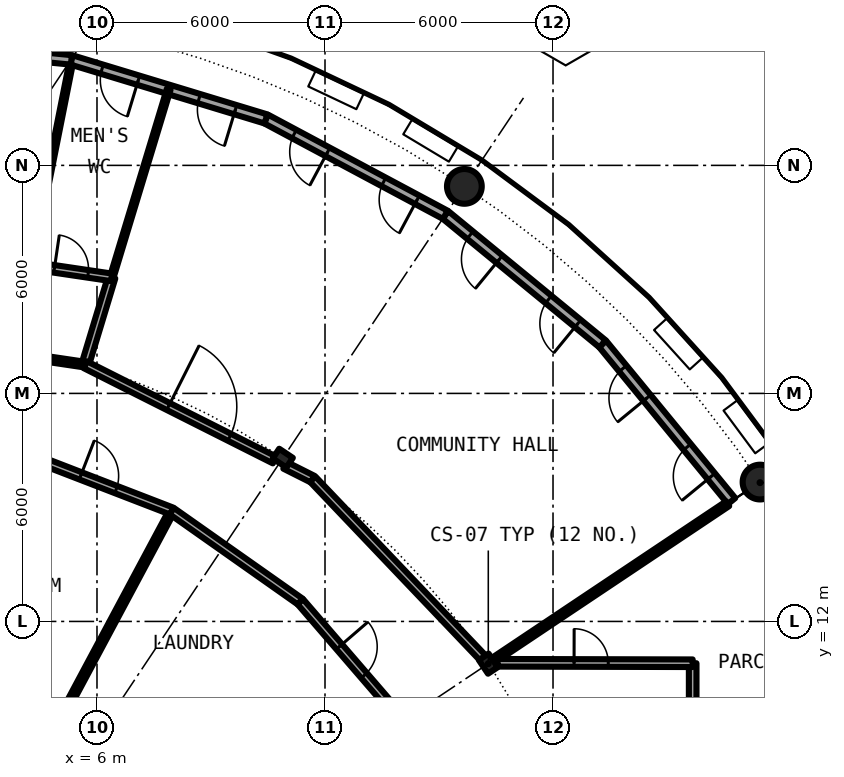
"""IFC4 building model, lengths in metres.
Left out: names, types, materials, properties, quantities, classifications, styles, units other than length and angle.
Written with IfcOpenShell. Run it as: python <this file> out.ifc"""

import sys

from ifc_helpers import new_model, si_unit, direction, frame, frame_2d, origin, origin_2d, place, context, subcontext, project, spatial, rectangle, hollow_circle, i_section, extrude, element, fill, save


model = new_model("IFC4")
c1 = context("Model", 3, precision=1e-05, world=origin(), true_north=direction((0.0, 1.0)))
c2 = subcontext(c1, "Body", "Model", "MODEL_VIEW")
j1 = project(units=[si_unit("LENGTHUNIT", "METRE"), si_unit("PLANEANGLEUNIT", "RADIAN")], contexts=[c1])
p1 = place(None, origin())
s1 = spatial("IfcSite", under=j1, at=p1, CompositionType="ELEMENT")
p2 = place(p1, origin())
s2 = spatial("IfcBuilding", under=s1, at=p2, CompositionType="ELEMENT")
p3 = place(p2, frame((0.0, 0.0, 107.45)))
s3 = spatial("IfcBuildingStorey", under=s2, at=p3, CompositionType="ELEMENT", Elevation=107.45)
for number, where, z_axis, x_axis in (
    (1, (23.448, 15.667, 0.0), (0.0, 0.0, 1.0), (1.0, 0.0, 0.0)),
    (2, (15.667, 23.448, 0.0), (0.0, 0.0, 1.0), (1.0, 0.0, 0.0)),
):
    element("IfcColumn", number, at=place(p3, frame(where, z_axis=z_axis, x_axis=x_axis)), inside=s3, PredefinedType="COLUMN", context=c2, shape_type="SweptSolid", body=[
        extrude(hollow_circle(Radius=0.457, WallThickness=0.04, at=origin_2d()), origin(), (0.0, 0.0, 1.0), 4.2),
    ])
for number, where, z_axis, x_axis in (
    (3, (16.297, 10.889, 0.0), (0.0, 0.0, 1.0), (0.831, 0.556, 0.0)),
    (4, (10.889, 16.297, 0.0), (0.0, 0.0, 1.0), (0.556, 0.831, 0.0)),
):
    element("IfcColumn", number, at=place(p3, frame(where, z_axis=z_axis, x_axis=x_axis)), inside=s3, PredefinedType="COLUMN", context=c2, shape_type="SweptSolid", body=[
        extrude(i_section(OverallWidth=0.307, OverallDepth=0.432, WebThickness=0.021, FlangeThickness=0.04, FilletRadius=0.027, at=origin_2d()), origin(), (0.0, 0.0, 1.0), 4.2),
    ])
p4 = place(p3, frame((22.699, 15.167, 0.0), z_axis=(0.0, 0.0, 1.0), x_axis=(-0.634382322723, 0.773019449054, 0.0)))
e5 = element("IfcWall", 5, at=p4, inside=s3, PredefinedType="SOLIDWALL", context=c2, shape_type="SweptSolid", body=[
    extrude(rectangle(XDim=5.352, YDim=0.25, at=frame_2d((2.676, 0.0))), origin(), (0.0, 0.0, 1.0), 3.85),
])
p5 = place(p4, frame((0.841, 0.0, 0.0)))
e6 = element("IfcOpeningElement", 6, at=p5, cuts=e5, PredefinedType="OPENING", context=c2, shape_type="SweptSolid", body=[
    extrude(rectangle(XDim=1.0, YDim=2.2, at=frame_2d((0.5, 1.1))), frame((0.0, 0.135, 0.0), z_axis=(0.0, -1.0, 0.0), x_axis=(1.0, 0.0, 0.0)), (0.0, 0.0, 1.0), 0.27),
])
p6 = place(p4, frame((3.51, 0.0, 0.0)))
e7 = element("IfcOpeningElement", 7, at=p6, cuts=e5, PredefinedType="OPENING", context=c2, shape_type="SweptSolid", body=[
    extrude(rectangle(XDim=1.0, YDim=2.2, at=frame_2d((0.5, 1.1))), frame((0.0, 0.135, 0.0), z_axis=(0.0, -1.0, 0.0), x_axis=(1.0, 0.0, 0.0)), (0.0, 0.0, 1.0), 0.27),
])
p7 = place(p3, frame((19.304, 19.304, 0.0), z_axis=(0.0, 0.0, 1.0), x_axis=(-0.773019449054, 0.634382322723, 0.0)))
e8 = element("IfcWall", 8, at=p7, inside=s3, PredefinedType="SOLIDWALL", context=c2, shape_type="SweptSolid", body=[
    extrude(rectangle(XDim=5.352, YDim=0.25, at=frame_2d((2.676, 0.0))), origin(), (0.0, 0.0, 1.0), 3.85),
])
p8 = place(p7, frame((0.841, 0.0, 0.0)))
e9 = element("IfcOpeningElement", 9, at=p8, cuts=e8, PredefinedType="OPENING", context=c2, shape_type="SweptSolid", body=[
    extrude(rectangle(XDim=1.0, YDim=2.2, at=frame_2d((0.5, 1.1))), frame((0.0, 0.135, 0.0), z_axis=(0.0, -1.0, 0.0), x_axis=(1.0, 0.0, 0.0)), (0.0, 0.0, 1.0), 0.27),
])
p9 = place(p7, frame((3.51, 0.0, 0.0)))
e10 = element("IfcOpeningElement", 10, at=p9, cuts=e8, PredefinedType="OPENING", context=c2, shape_type="SweptSolid", body=[
    extrude(rectangle(XDim=1.0, YDim=2.2, at=frame_2d((0.5, 1.1))), frame((0.0, 0.135, 0.0), z_axis=(0.0, -1.0, 0.0), x_axis=(1.0, 0.0, 0.0)), (0.0, 0.0, 1.0), 0.27),
])
p10 = place(p3, frame((15.167, 22.699, 0.0), z_axis=(0.0, 0.0, 1.0), x_axis=(-0.881915646801, 0.471407246368, 0.0)))
e11 = element("IfcWall", 11, at=p10, inside=s3, PredefinedType="SOLIDWALL", context=c2, shape_type="SweptSolid", body=[
    extrude(rectangle(XDim=5.352, YDim=0.25, at=frame_2d((2.676, 0.0))), origin(), (0.0, 0.0, 1.0), 3.85),
])
p11 = place(p10, frame((0.841, 0.0, 0.0)))
e12 = element("IfcOpeningElement", 12, at=p11, cuts=e11, PredefinedType="OPENING", context=c2, shape_type="SweptSolid", body=[
    extrude(rectangle(XDim=1.0, YDim=2.2, at=frame_2d((0.5, 1.1))), frame((0.0, 0.135, 0.0), z_axis=(0.0, -1.0, 0.0), x_axis=(1.0, 0.0, 0.0)), (0.0, 0.0, 1.0), 0.27),
])
p12 = place(p10, frame((3.51, 0.0, 0.0)))
e13 = element("IfcOpeningElement", 13, at=p12, cuts=e11, PredefinedType="OPENING", context=c2, shape_type="SweptSolid", body=[
    extrude(rectangle(XDim=1.0, YDim=2.2, at=frame_2d((0.5, 1.1))), frame((0.0, 0.135, 0.0), z_axis=(0.0, -1.0, 0.0), x_axis=(1.0, 0.0, 0.0)), (0.0, 0.0, 1.0), 0.27),
])
p13 = place(p3, frame((10.447, 25.222, 0.0), z_axis=(0.0, 0.0, 1.0), x_axis=(-0.956965678721, 0.290201119486, 0.0)))
e14 = element("IfcWall", 14, at=p13, inside=s3, PredefinedType="SOLIDWALL", context=c2, shape_type="SweptSolid", body=[
    extrude(rectangle(XDim=5.351, YDim=0.25, at=frame_2d((2.676, 0.0))), origin(), (0.0, 0.0, 1.0), 3.85),
])
p14 = place(p13, frame((0.841, 0.0, 0.0)))
e15 = element("IfcOpeningElement", 15, at=p14, cuts=e14, PredefinedType="OPENING", context=c2, shape_type="SweptSolid", body=[
    extrude(rectangle(XDim=1.0, YDim=2.2, at=frame_2d((0.5, 1.1))), frame((0.0, 0.135, 0.0), z_axis=(0.0, -1.0, 0.0), x_axis=(1.0, 0.0, 0.0)), (0.0, 0.0, 1.0), 0.27),
])
p15 = place(p13, frame((3.51, 0.0, 0.0)))
e16 = element("IfcOpeningElement", 16, at=p15, cuts=e14, PredefinedType="OPENING", context=c2, shape_type="SweptSolid", body=[
    extrude(rectangle(XDim=1.0, YDim=2.2, at=frame_2d((0.5, 1.1))), frame((0.0, 0.135, 0.0), z_axis=(0.0, -1.0, 0.0), x_axis=(1.0, 0.0, 0.0)), (0.0, 0.0, 1.0), 0.27),
])
p16 = place(p3, frame((5.326, 26.775, 0.0), z_axis=(0.0, 0.0, 1.0), x_axis=(-0.995173996315, 0.098126026407, 0.0)))
e17 = element("IfcWall", 17, at=p16, inside=s3, PredefinedType="SOLIDWALL", context=c2, shape_type="SweptSolid", body=[
    extrude(rectangle(XDim=5.352, YDim=0.25, at=frame_2d((2.676, 0.0))), origin(), (0.0, 0.0, 1.0), 3.85),
])
p17 = place(p16, frame((0.841, 0.0, 0.0)))
e18 = element("IfcOpeningElement", 18, at=p17, cuts=e17, PredefinedType="OPENING", context=c2, shape_type="SweptSolid", body=[
    extrude(rectangle(XDim=1.0, YDim=2.2, at=frame_2d((0.5, 1.1))), frame((0.0, 0.135, 0.0), z_axis=(0.0, -1.0, 0.0), x_axis=(1.0, 0.0, 0.0)), (0.0, 0.0, 1.0), 0.27),
])
p18 = place(p16, frame((3.51, 0.0, 0.0)))
e19 = element("IfcOpeningElement", 19, at=p18, cuts=e17, PredefinedType="OPENING", context=c2, shape_type="SweptSolid", body=[
    extrude(rectangle(XDim=1.0, YDim=2.2, at=frame_2d((0.5, 1.1))), frame((0.0, 0.135, 0.0), z_axis=(0.0, -1.0, 0.0), x_axis=(1.0, 0.0, 0.0)), (0.0, 0.0, 1.0), 0.27),
])
p19 = place(p3, frame((21.675, 9.2, 0.0), z_axis=(0.0, 0.0, 1.0), x_axis=(0.0, 1.0, 0.0)))
e20 = element("IfcWall", 20, at=p19, inside=s3, PredefinedType="PARTITIONING", context=c2, shape_type="SweptSolid", body=[
    extrude(rectangle(XDim=1.7, YDim=0.2, at=frame_2d((0.85, 0.0))), origin(), (0.0, 0.0, 1.0), 3.85),
])
p20 = place(p3, frame((3.639, 6.808, 0.0), z_axis=(0.0, 0.0, 1.0), x_axis=(0.471460365694, 0.881887251059, 0.0)))
e21 = element("IfcWall", 21, at=p20, inside=s3, PredefinedType="PARTITIONING", context=c2, shape_type="SweptSolid", body=[
    extrude(rectangle(XDim=9.18, YDim=0.15, at=frame_2d((4.59, 0.0))), origin(), (0.0, 0.0, 1.0), 3.85),
])
p21 = place(p3, frame((4.258, 21.368, 0.0), z_axis=(0.0, 0.0, 1.0), x_axis=(0.195296766469, 0.980744193461, 0.0)))
e22 = element("IfcWall", 22, at=p21, inside=s3, PredefinedType="PARTITIONING", context=c2, shape_type="SweptSolid", body=[
    extrude(rectangle(XDim=5.387, YDim=0.1, at=frame_2d((2.693, 0.0))), origin(), (0.0, 0.0, 1.0), 3.85),
])
p22 = place(p3, frame((5.69, 18.756, 0.0), z_axis=(0.0, 0.0, 1.0), x_axis=(0.290015865164, 0.957021837762, 0.0)))
e23 = element("IfcWall", 23, at=p22, inside=s3, PredefinedType="PARTITIONING", context=c2, shape_type="SweptSolid", body=[
    extrude(rectangle(XDim=2.4, YDim=0.2, at=frame_2d((1.2, 0.0))), origin(), (0.0, 0.0, 1.0), 3.85),
])
p23 = place(p3, frame((6.386, 21.053, 0.0), z_axis=(0.0, 0.0, 1.0), x_axis=(0.29025094386, 0.956950567996, 0.0)))
e24 = element("IfcWall", 24, at=p23, inside=s3, PredefinedType="PARTITIONING", context=c2, shape_type="SweptSolid", body=[
    extrude(rectangle(XDim=5.175, YDim=0.1, at=frame_2d((2.587, 0.0))), origin(), (0.0, 0.0, 1.0), 3.85),
])
p24 = place(p3, frame((16.477, 11.009, 0.0), z_axis=(0.0, 0.0, 1.0), x_axis=(0.831406593008, 0.555664536482, 0.0)))
e25 = element("IfcWall", 25, at=p24, inside=s3, PredefinedType="PARTITIONING", context=c2, shape_type="SweptSolid", body=[
    extrude(rectangle(XDim=7.358, YDim=0.15, at=frame_2d((3.679, 0.0))), origin(), (0.0, 0.0, 1.0), 3.85),
])
p25 = place(p3, frame((16.541, 10.912, 0.0), z_axis=(0.0, 0.0, 1.0), x_axis=(0.999997173357, -0.002377662213, 0.0)))
e26 = element("IfcWall", 26, at=p25, inside=s3, PredefinedType="PARTITIONING", context=c2, shape_type="SweptSolid", body=[
    extrude(rectangle(XDim=5.134, YDim=0.2, at=frame_2d((2.567, 0.0))), origin(), (0.0, 0.0, 1.0), 3.85),
])
p26 = place(p25, frame((2.013, 0.0, 0.0)))
e27 = element("IfcOpeningElement", 27, at=p26, cuts=e26, PredefinedType="OPENING", context=c2, shape_type="SweptSolid", body=[
    extrude(rectangle(XDim=0.9, YDim=2.3, at=frame_2d((0.45, 1.15))), frame((0.0, 0.11, 0.0), z_axis=(0.0, -1.0, 0.0), x_axis=(1.0, 0.0, 0.0)), (0.0, 0.0, 1.0), 0.22),
])
p27 = place(p3, frame((4.106, 16.394, 0.0), z_axis=(0.0, 0.0, 1.0), x_axis=(0.932943640288, -0.360022449363, 0.0)))
e28 = element("IfcWall", 28, at=p27, inside=s3, PredefinedType="PARTITIONING", context=c2, shape_type="SweptSolid", body=[
    extrude(rectangle(XDim=4.139, YDim=0.2, at=frame_2d((2.069, 0.0))), origin(), (0.0, 0.0, 1.0), 3.85),
])
p28 = place(p27, frame((1.569, 0.0, 0.0)))
e29 = element("IfcOpeningElement", 29, at=p28, cuts=e28, PredefinedType="OPENING", context=c2, shape_type="SweptSolid", body=[
    extrude(rectangle(XDim=1.0, YDim=2.3, at=frame_2d((0.5, 1.15))), frame((0.0, 0.11, 0.0), z_axis=(0.0, -1.0, 0.0), x_axis=(1.0, 0.0, 0.0)), (0.0, 0.0, 1.0), 0.22),
])
p29 = place(p3, frame((7.967, 14.904, 0.0), z_axis=(0.0, 0.0, 1.0), x_axis=(0.817567680547, -0.575832517079, 0.0)))
e30 = element("IfcWall", 30, at=p29, inside=s3, PredefinedType="PARTITIONING", context=c2, shape_type="SweptSolid", body=[
    extrude(rectangle(XDim=4.137, YDim=0.2, at=frame_2d((2.068, 0.0))), origin(), (0.0, 0.0, 1.0), 3.85),
])
p30 = place(p3, frame((11.349, 12.522, 0.0), z_axis=(0.0, 0.0, 1.0), x_axis=(0.653212695939, -0.757174467256, 0.0)))
e31 = element("IfcWall", 31, at=p30, inside=s3, PredefinedType="PARTITIONING", context=c2, shape_type="SweptSolid", body=[
    extrude(rectangle(XDim=4.138, YDim=0.2, at=frame_2d((2.069, 0.0))), origin(), (0.0, 0.0, 1.0), 3.85),
])
p31 = place(p30, frame((1.569, 0.0, 0.0)))
e32 = element("IfcOpeningElement", 32, at=p31, cuts=e31, PredefinedType="OPENING", context=c2, shape_type="SweptSolid", body=[
    extrude(rectangle(XDim=1.0, YDim=2.3, at=frame_2d((0.5, 1.15))), frame((0.0, 0.11, 0.0), z_axis=(0.0, -1.0, 0.0), x_axis=(1.0, 0.0, 0.0)), (0.0, 0.0, 1.0), 0.22),
])
p32 = place(p3, frame((5.69, 18.756, 0.0), z_axis=(0.0, 0.0, 1.0), x_axis=(0.893207084241, -0.449645532239, 0.0)))
e33 = element("IfcWall", 33, at=p32, inside=s3, PredefinedType="PARTITIONING", context=c2, shape_type="SweptSolid", body=[
    extrude(rectangle(XDim=5.578, YDim=0.2, at=frame_2d((2.789, 0.0))), origin(), (0.0, 0.0, 1.0), 3.54),
])
p33 = place(p32, frame((2.451, 0.0, 0.0)))
e34 = element("IfcOpeningElement", 34, at=p33, cuts=e33, PredefinedType="OPENING", context=c2, shape_type="SweptSolid", body=[
    extrude(rectangle(XDim=1.8, YDim=2.3, at=frame_2d((0.9, 1.15))), frame((0.0, 0.11, 0.0), z_axis=(0.0, -1.0, 0.0), x_axis=(1.0, 0.0, 0.0)), (0.0, 0.0, 1.0), 0.22),
])
p34 = place(p3, frame((10.948, 16.109, 0.0), z_axis=(0.0, 0.0, 1.0), x_axis=(0.893466351981, -0.449130134681, 0.0)))
e35 = element("IfcWall", 35, at=p34, inside=s3, PredefinedType="PARTITIONING", context=c2, shape_type="SweptSolid", body=[
    extrude(rectangle(XDim=0.815, YDim=0.2, at=frame_2d((0.407, 0.0))), origin(), (0.0, 0.0, 1.0), 3.85),
])
p35 = place(p3, frame((11.676, 15.743, 0.0), z_axis=(0.0, 0.0, 1.0), x_axis=(0.689473533908, -0.724310876655, 0.0)))
e36 = element("IfcWall", 36, at=p35, inside=s3, PredefinedType="PARTITIONING", context=c2, shape_type="SweptSolid", body=[
    extrude(rectangle(XDim=6.545, YDim=0.2, at=frame_2d((3.273, 0.0))), origin(), (0.0, 0.0, 1.0), 3.54),
])
p36 = place(p3, frame((3.939, 19.016, 0.0), z_axis=(0.0, 0.0, 1.0), x_axis=(0.989153791914, -0.146883545509, 0.0)))
e37 = element("IfcWall", 37, at=p36, inside=s3, PredefinedType="PARTITIONING", context=c2, shape_type="SweptSolid", body=[
    extrude(rectangle(XDim=1.77, YDim=0.15, at=frame_2d((0.885, 0.0))), origin(), (0.0, 0.0, 1.0), 3.54),
])
p37 = place(p3, frame((-0.009, 22.0, 0.0), z_axis=(0.0, 0.0, 1.0), x_axis=(0.989212179465, -0.146489808511, 0.0)))
e38 = element("IfcWall", 38, at=p37, inside=s3, PredefinedType="PARTITIONING", context=c2, shape_type="SweptSolid", body=[
    extrude(rectangle(XDim=6.465, YDim=0.2, at=frame_2d((3.232, 0.0))), origin(), (0.0, 0.0, 1.0), 3.85),
])
p38 = place(p37, frame((4.939, 0.0, 0.0)))
e39 = element("IfcOpeningElement", 39, at=p38, cuts=e38, PredefinedType="OPENING", context=c2, shape_type="SweptSolid", body=[
    extrude(rectangle(XDim=0.9, YDim=2.3, at=frame_2d((0.45, 1.15))), frame((0.0, 0.11, 0.0), z_axis=(0.0, -1.0, 0.0), x_axis=(1.0, 0.0, 0.0)), (0.0, 0.0, 1.0), 0.22),
])
p39 = place(p37, frame((2.787, 0.0, 0.0)))
e40 = element("IfcOpeningElement", 40, at=p39, cuts=e38, PredefinedType="OPENING", context=c2, shape_type="SweptSolid", body=[
    extrude(rectangle(XDim=0.9, YDim=2.3, at=frame_2d((0.45, 1.15))), frame((0.0, 0.11, 0.0), z_axis=(0.0, -1.0, 0.0), x_axis=(1.0, 0.0, 0.0)), (0.0, 0.0, 1.0), 0.22),
])
p40 = place(p37, frame((0.635, 0.0, 0.0)))
e41 = element("IfcOpeningElement", 41, at=p40, cuts=e38, PredefinedType="OPENING", context=c2, shape_type="SweptSolid", body=[
    extrude(rectangle(XDim=0.9, YDim=2.3, at=frame_2d((0.45, 1.15))), frame((0.0, 0.11, 0.0), z_axis=(0.0, -1.0, 0.0), x_axis=(1.0, 0.0, 0.0)), (0.0, 0.0, 1.0), 0.22),
])
p41 = place(p5, origin())
e42 = element("IfcDoor", 42, at=p41, inside=s3, OperationType="SINGLE_SWING_LEFT", PredefinedType="DOOR", context=c2, shape_type="SweptSolid", body=[
    extrude(rectangle(XDim=1.0, YDim=2.2, at=frame_2d((0.5, 1.1))), frame((0.0, 0.025, 0.0), z_axis=(0.0, -1.0, 0.0), x_axis=(1.0, 0.0, 0.0)), (0.0, 0.0, 1.0), 0.05),
])
fill(e6, e42)
p42 = place(p6, origin())
e43 = element("IfcDoor", 43, at=p42, inside=s3, OperationType="SINGLE_SWING_LEFT", PredefinedType="DOOR", context=c2, shape_type="SweptSolid", body=[
    extrude(rectangle(XDim=1.0, YDim=2.2, at=frame_2d((0.5, 1.1))), frame((0.0, 0.025, 0.0), z_axis=(0.0, -1.0, 0.0), x_axis=(1.0, 0.0, 0.0)), (0.0, 0.0, 1.0), 0.05),
])
fill(e7, e43)
p43 = place(p8, origin())
e44 = element("IfcDoor", 44, at=p43, inside=s3, OperationType="SINGLE_SWING_LEFT", PredefinedType="DOOR", context=c2, shape_type="SweptSolid", body=[
    extrude(rectangle(XDim=1.0, YDim=2.2, at=frame_2d((0.5, 1.1))), frame((0.0, 0.025, 0.0), z_axis=(0.0, -1.0, 0.0), x_axis=(1.0, 0.0, 0.0)), (0.0, 0.0, 1.0), 0.05),
])
fill(e9, e44)
p44 = place(p9, origin())
e45 = element("IfcDoor", 45, at=p44, inside=s3, OperationType="SINGLE_SWING_LEFT", PredefinedType="DOOR", context=c2, shape_type="SweptSolid", body=[
    extrude(rectangle(XDim=1.0, YDim=2.2, at=frame_2d((0.5, 1.1))), frame((0.0, 0.025, 0.0), z_axis=(0.0, -1.0, 0.0), x_axis=(1.0, 0.0, 0.0)), (0.0, 0.0, 1.0), 0.05),
])
fill(e10, e45)
p45 = place(p11, origin())
e46 = element("IfcDoor", 46, at=p45, inside=s3, OperationType="SINGLE_SWING_LEFT", PredefinedType="DOOR", context=c2, shape_type="SweptSolid", body=[
    extrude(rectangle(XDim=1.0, YDim=2.2, at=frame_2d((0.5, 1.1))), frame((0.0, 0.025, 0.0), z_axis=(0.0, -1.0, 0.0), x_axis=(1.0, 0.0, 0.0)), (0.0, 0.0, 1.0), 0.05),
])
fill(e12, e46)
p46 = place(p12, origin())
e47 = element("IfcDoor", 47, at=p46, inside=s3, OperationType="SINGLE_SWING_LEFT", PredefinedType="DOOR", context=c2, shape_type="SweptSolid", body=[
    extrude(rectangle(XDim=1.0, YDim=2.2, at=frame_2d((0.5, 1.1))), frame((0.0, 0.025, 0.0), z_axis=(0.0, -1.0, 0.0), x_axis=(1.0, 0.0, 0.0)), (0.0, 0.0, 1.0), 0.05),
])
fill(e13, e47)
p47 = place(p14, origin())
e48 = element("IfcDoor", 48, at=p47, inside=s3, OperationType="SINGLE_SWING_LEFT", PredefinedType="DOOR", context=c2, shape_type="SweptSolid", body=[
    extrude(rectangle(XDim=1.0, YDim=2.2, at=frame_2d((0.5, 1.1))), frame((0.0, 0.025, 0.0), z_axis=(0.0, -1.0, 0.0), x_axis=(1.0, 0.0, 0.0)), (0.0, 0.0, 1.0), 0.05),
])
fill(e15, e48)
p48 = place(p15, origin())
e49 = element("IfcDoor", 49, at=p48, inside=s3, OperationType="SINGLE_SWING_LEFT", PredefinedType="DOOR", context=c2, shape_type="SweptSolid", body=[
    extrude(rectangle(XDim=1.0, YDim=2.2, at=frame_2d((0.5, 1.1))), frame((0.0, 0.025, 0.0), z_axis=(0.0, -1.0, 0.0), x_axis=(1.0, 0.0, 0.0)), (0.0, 0.0, 1.0), 0.05),
])
fill(e16, e49)
p49 = place(p38, origin())
e50 = element("IfcDoor", 50, at=p49, inside=s3, OperationType="SINGLE_SWING_RIGHT", PredefinedType="DOOR", context=c2, shape_type="SweptSolid", body=[
    extrude(rectangle(XDim=0.9, YDim=2.3, at=frame_2d((0.45, 1.15))), frame((0.0, 0.025, 0.0), z_axis=(0.0, -1.0, 0.0), x_axis=(1.0, 0.0, 0.0)), (0.0, 0.0, 1.0), 0.05),
])
fill(e39, e50)
p50 = place(p33, origin())
e51 = element("IfcDoor", 51, at=p50, inside=s3, OperationType="DOUBLE_DOOR_SINGLE_SWING", PredefinedType="DOOR", context=c2, shape_type="SweptSolid", body=[
    extrude(rectangle(XDim=1.8, YDim=2.3, at=frame_2d((0.9, 1.15))), frame((0.0, 0.025, 0.0), z_axis=(0.0, -1.0, 0.0), x_axis=(1.0, 0.0, 0.0)), (0.0, 0.0, 1.0), 0.05),
])
fill(e34, e51)
p51 = place(p31, origin())
e52 = element("IfcDoor", 52, at=p51, inside=s3, OperationType="SINGLE_SWING_LEFT", PredefinedType="DOOR", context=c2, shape_type="SweptSolid", body=[
    extrude(rectangle(XDim=1.0, YDim=2.3, at=frame_2d((0.5, 1.15))), frame((0.0, 0.025, 0.0), z_axis=(0.0, -1.0, 0.0), x_axis=(1.0, 0.0, 0.0)), (0.0, 0.0, 1.0), 0.05),
])
fill(e32, e52)
p52 = place(p28, origin())
e53 = element("IfcDoor", 53, at=p52, inside=s3, OperationType="SINGLE_SWING_LEFT", PredefinedType="DOOR", context=c2, shape_type="SweptSolid", body=[
    extrude(rectangle(XDim=1.0, YDim=2.3, at=frame_2d((0.5, 1.15))), frame((0.0, 0.025, 0.0), z_axis=(0.0, -1.0, 0.0), x_axis=(1.0, 0.0, 0.0)), (0.0, 0.0, 1.0), 0.05),
])
fill(e29, e53)
p53 = place(p26, origin())
e54 = element("IfcDoor", 54, at=p53, inside=s3, OperationType="SINGLE_SWING_LEFT", PredefinedType="DOOR", context=c2, shape_type="SweptSolid", body=[
    extrude(rectangle(XDim=0.9, YDim=2.3, at=frame_2d((0.45, 1.15))), frame((0.0, 0.025, 0.0), z_axis=(0.0, -1.0, 0.0), x_axis=(1.0, 0.0, 0.0)), (0.0, 0.0, 1.0), 0.05),
])
fill(e27, e54)
save(model, sys.argv[1])
